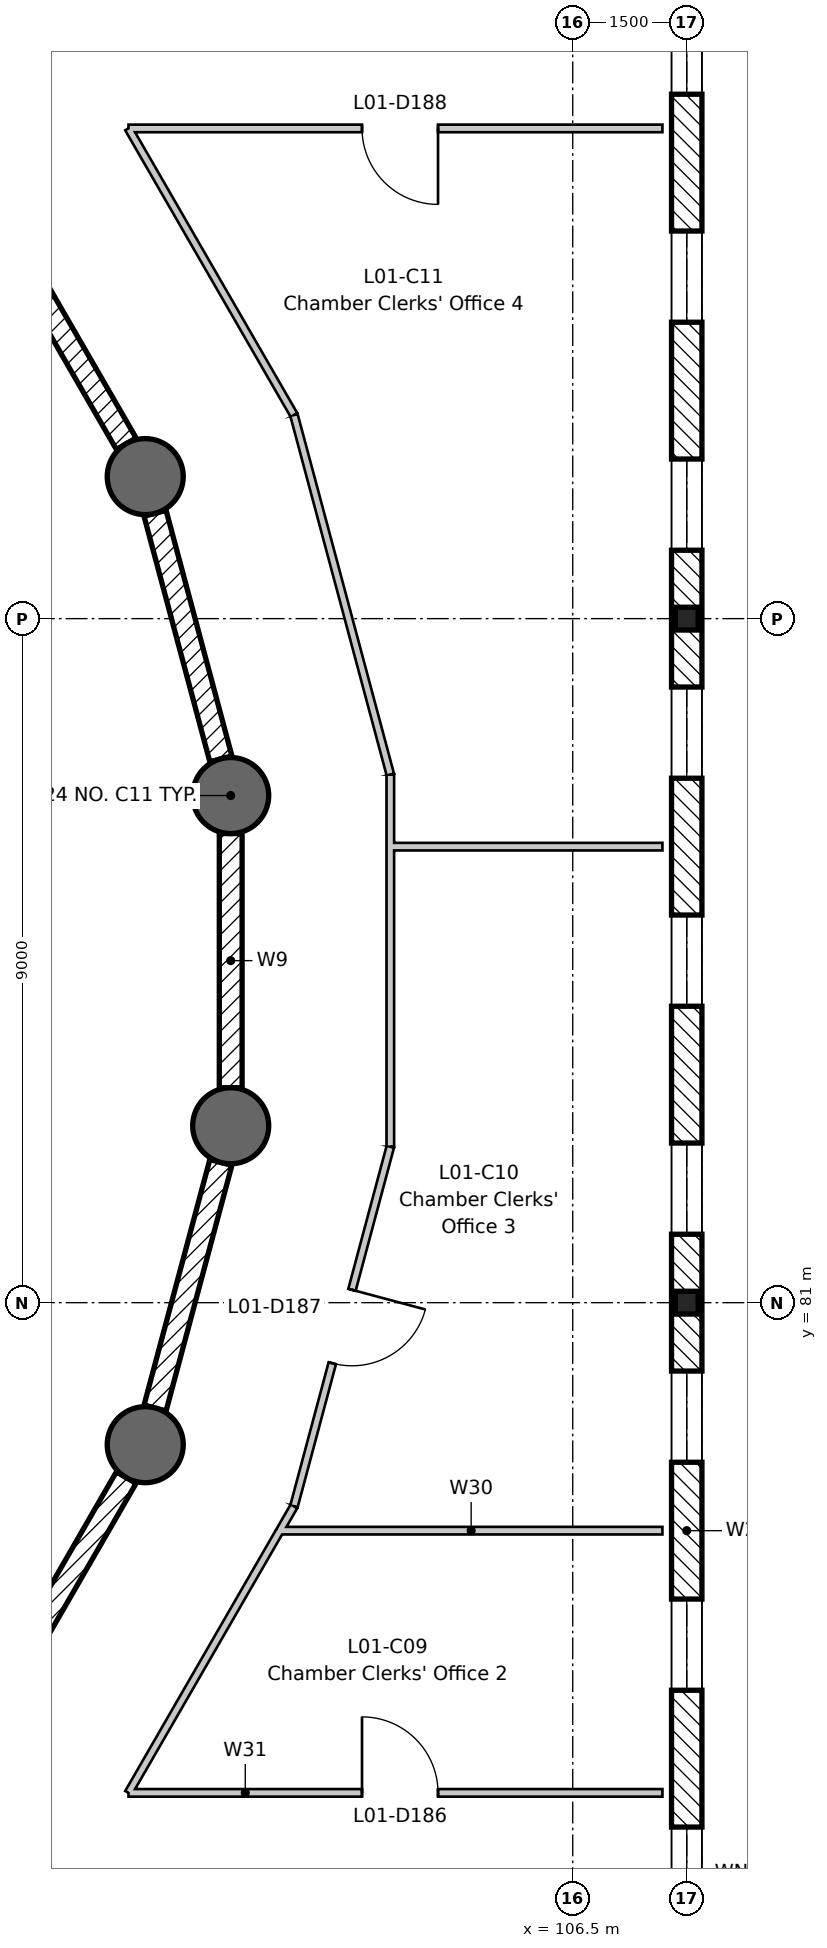
"""IFC4 building model, lengths in metres.
Left out: names, types, materials, properties, quantities, classifications, styles, units other than length and angle.
Written with IfcOpenShell. Run it as: python <this file> out.ifc"""

import sys

from ifc_helpers import new_model, si_unit, direction, frame, frame_2d, origin, origin_2d, place, context, subcontext, project, spatial, rectangle, circle, i_section, extrude, element, fill, save


model = new_model("IFC4")
c1 = context("Model", 3, precision=1e-05, world=origin(), true_north=direction((0.0, 1.0)))
c2 = subcontext(c1, "Body", "Model", "MODEL_VIEW")
j1 = project(units=[si_unit("LENGTHUNIT", "METRE"), si_unit("PLANEANGLEUNIT", "RADIAN")], contexts=[c1])
p1 = place(None, origin())
s1 = spatial("IfcSite", under=j1, at=p1, CompositionType="ELEMENT")
p2 = place(p1, origin())
s2 = spatial("IfcBuilding", under=s1, at=p2, CompositionType="ELEMENT")
p3 = place(p2, frame((0.0, 0.0, 5.4)))
s3 = spatial("IfcBuildingStorey", under=s2, at=p3, CompositionType="ELEMENT", Elevation=5.4)
for number, where, z_axis, x_axis in (
    (1, (102.0, 87.672, -0.2), (0.0, 0.0, 1.0), (1.0, 0.0, 0.0)),
    (2, (100.875, 91.869, -0.2), (0.0, 0.0, 1.0), (1.0, 0.0, 0.0)),
    (3, (100.875, 79.131, -0.2), (0.0, 0.0, 1.0), (1.0, 0.0, 0.0)),
    (4, (102.0, 83.328, -0.2), (0.0, 0.0, 1.0), (1.0, 0.0, 0.0)),
):
    element("IfcColumn", number, at=place(p3, frame(where, z_axis=z_axis, x_axis=x_axis)), inside=s3, PredefinedType="COLUMN", context=c2, shape_type="SweptSolid", body=[
        extrude(circle(Radius=0.5, at=origin_2d()), origin(), (0.0, 0.0, 1.0), 2.7),
    ])
for number, where, z_axis, x_axis in (
    (5, (108.0, 81.0, -0.2), (0.0, 0.0, 1.0), (1.0, 0.0, 0.0)),
    (6, (108.0, 90.0, -0.2), (0.0, 0.0, 1.0), (1.0, 0.0, 0.0)),
):
    element("IfcColumn", number, at=place(p3, frame(where, z_axis=z_axis, x_axis=x_axis)), inside=s3, PredefinedType="COLUMN", context=c2, shape_type="SweptSolid", body=[
        extrude(i_section(OverallWidth=0.3, OverallDepth=0.3, WebThickness=0.011, FlangeThickness=0.019, FilletRadius=0.027, at=origin_2d()), origin(), (0.0, 0.0, 1.0), 4.5),
    ])
for number, where, z_axis, x_axis in (
    (7, (101.871, 88.155, 0.0), (0.0, 0.0, 1.0), (-0.259, 0.966, 0.0)),
    (8, (100.625, 92.302, 0.0), (0.0, 0.0, 1.0), (-0.5, 0.866, 0.0)),
    (9, (98.953, 75.802, 0.0), (0.0, 0.0, 1.0), (0.5, 0.866, 0.0)),
    (10, (101.005, 79.614, 0.0), (0.0, 0.0, 1.0), (0.259, 0.966, 0.0)),
):
    element("IfcWall", number, at=place(p3, frame(where, z_axis=z_axis, x_axis=x_axis)), inside=s3, PredefinedType="PARTITIONING", context=c2, shape_type="SweptSolid", body=[
        extrude(rectangle(XDim=3.344, YDim=0.3, at=frame_2d((1.672, 0.0))), origin(), (0.0, 0.0, 1.0), 2.5),
    ])
p4 = place(p3, frame((102.0, 83.828, 0.0), z_axis=(0.0, 0.0, 1.0), x_axis=(0.0, 1.0, 0.0)))
e11 = element("IfcWall", 11, at=p4, inside=s3, PredefinedType="PARTITIONING", context=c2, shape_type="SweptSolid", body=[
    extrude(rectangle(XDim=3.345, YDim=0.3, at=frame_2d((1.672, 0.0))), origin(), (0.0, 0.0, 1.0), 2.5),
])
p5 = place(p3, frame((108.0, 72.0, 0.0), z_axis=(0.0, 0.0, 1.0), x_axis=(0.0, 1.0, 0.0)))
e12 = element("IfcWall", 12, at=p5, inside=s3, PredefinedType="STANDARD", context=c2, shape_type="SweptSolid", body=[
    extrude(rectangle(XDim=27.0, YDim=0.4, at=frame_2d((13.5, 0.0))), origin(), (0.0, 0.0, 1.0), 3.81),
])
p6 = place(p5, frame((0.9, 0.0, 0.9)))
e13 = element("IfcOpeningElement", 13, at=p6, cuts=e12, PredefinedType="OPENING", context=c2, shape_type="SweptSolid", body=[
    extrude(rectangle(XDim=1.2, YDim=2.4, at=frame_2d((0.6, 1.2))), frame((0.0, 0.21, 0.0), z_axis=(0.0, -1.0, 0.0), x_axis=(1.0, 0.0, 0.0)), (0.0, 0.0, 1.0), 0.42),
])
p7 = place(p5, frame((3.9, 0.0, 0.9)))
e14 = element("IfcOpeningElement", 14, at=p7, cuts=e12, PredefinedType="OPENING", context=c2, shape_type="SweptSolid", body=[
    extrude(rectangle(XDim=1.2, YDim=2.4, at=frame_2d((0.6, 1.2))), frame((0.0, 0.21, 0.0), z_axis=(0.0, -1.0, 0.0), x_axis=(1.0, 0.0, 0.0)), (0.0, 0.0, 1.0), 0.42),
])
p8 = place(p5, frame((6.9, 0.0, 0.9)))
e15 = element("IfcOpeningElement", 15, at=p8, cuts=e12, PredefinedType="OPENING", context=c2, shape_type="SweptSolid", body=[
    extrude(rectangle(XDim=1.2, YDim=2.4, at=frame_2d((0.6, 1.2))), frame((0.0, 0.21, 0.0), z_axis=(0.0, -1.0, 0.0), x_axis=(1.0, 0.0, 0.0)), (0.0, 0.0, 1.0), 0.42),
])
p9 = place(p5, frame((9.9, 0.0, 0.9)))
e16 = element("IfcOpeningElement", 16, at=p9, cuts=e12, PredefinedType="OPENING", context=c2, shape_type="SweptSolid", body=[
    extrude(rectangle(XDim=1.2, YDim=2.4, at=frame_2d((0.6, 1.2))), frame((0.0, 0.21, 0.0), z_axis=(0.0, -1.0, 0.0), x_axis=(1.0, 0.0, 0.0)), (0.0, 0.0, 1.0), 0.42),
])
p10 = place(p5, frame((12.9, 0.0, 0.9)))
e17 = element("IfcOpeningElement", 17, at=p10, cuts=e12, PredefinedType="OPENING", context=c2, shape_type="SweptSolid", body=[
    extrude(rectangle(XDim=1.2, YDim=2.4, at=frame_2d((0.6, 1.2))), frame((0.0, 0.21, 0.0), z_axis=(0.0, -1.0, 0.0), x_axis=(1.0, 0.0, 0.0)), (0.0, 0.0, 1.0), 0.42),
])
p11 = place(p5, frame((15.9, 0.0, 0.9)))
e18 = element("IfcOpeningElement", 18, at=p11, cuts=e12, PredefinedType="OPENING", context=c2, shape_type="SweptSolid", body=[
    extrude(rectangle(XDim=1.2, YDim=2.4, at=frame_2d((0.6, 1.2))), frame((0.0, 0.21, 0.0), z_axis=(0.0, -1.0, 0.0), x_axis=(1.0, 0.0, 0.0)), (0.0, 0.0, 1.0), 0.42),
])
p12 = place(p5, frame((18.9, 0.0, 0.9)))
e19 = element("IfcOpeningElement", 19, at=p12, cuts=e12, PredefinedType="OPENING", context=c2, shape_type="SweptSolid", body=[
    extrude(rectangle(XDim=1.2, YDim=2.4, at=frame_2d((0.6, 1.2))), frame((0.0, 0.21, 0.0), z_axis=(0.0, -1.0, 0.0), x_axis=(1.0, 0.0, 0.0)), (0.0, 0.0, 1.0), 0.42),
])
p13 = place(p5, frame((21.9, 0.0, 0.9)))
e20 = element("IfcOpeningElement", 20, at=p13, cuts=e12, PredefinedType="OPENING", context=c2, shape_type="SweptSolid", body=[
    extrude(rectangle(XDim=1.2, YDim=2.4, at=frame_2d((0.6, 1.2))), frame((0.0, 0.21, 0.0), z_axis=(0.0, -1.0, 0.0), x_axis=(1.0, 0.0, 0.0)), (0.0, 0.0, 1.0), 0.42),
])
p14 = place(p5, frame((24.9, 0.0, 0.9)))
e21 = element("IfcOpeningElement", 21, at=p14, cuts=e12, PredefinedType="OPENING", context=c2, shape_type="SweptSolid", body=[
    extrude(rectangle(XDim=1.2, YDim=2.4, at=frame_2d((0.6, 1.2))), frame((0.0, 0.21, 0.0), z_axis=(0.0, -1.0, 0.0), x_axis=(1.0, 0.0, 0.0)), (0.0, 0.0, 1.0), 0.42),
])
p15 = place(p3, frame((107.68, 78.0, 0.0), z_axis=(0.0, 0.0, 1.0), x_axis=(-1.0, 0.0, 0.0)))
e22 = element("IfcWall", 22, at=p15, inside=s3, PredefinedType="PARTITIONING", context=c2, shape_type="SweptSolid", body=[
    extrude(rectangle(XDim=5.033, YDim=0.1, at=frame_2d((2.516, 0.0))), origin(), (0.0, 0.0, 1.0), 3.81),
])
p16 = place(p3, frame((102.659, 78.02, 0.0), z_axis=(0.0, 0.0, 1.0), x_axis=(-0.500005512359, -0.866022221199, 0.0)))
e23 = element("IfcWall", 23, at=p16, inside=s3, PredefinedType="PARTITIONING", context=c2, shape_type="SweptSolid", body=[
    extrude(rectangle(XDim=4.007, YDim=0.1, at=frame_2d((2.003, 0.0))), origin(), (0.0, 0.0, 1.0), 3.81),
])
p17 = place(p3, frame((100.656, 74.55, 0.0), z_axis=(0.0, 0.0, 1.0), x_axis=(1.0, 0.0, 0.0)))
e24 = element("IfcWall", 24, at=p17, inside=s3, PredefinedType="PARTITIONING", context=c2, shape_type="SweptSolid", body=[
    extrude(rectangle(XDim=7.024, YDim=0.1, at=frame_2d((3.512, 0.0))), origin(), (0.0, 0.0, 1.0), 3.81),
])
p18 = place(p17, frame((3.072, 0.0, 0.0)))
e25 = element("IfcOpeningElement", 25, at=p18, cuts=e24, PredefinedType="OPENING", context=c2, shape_type="SweptSolid", body=[
    extrude(rectangle(XDim=1.0, YDim=2.1, at=frame_2d((0.5, 1.05))), frame((0.0, 0.06, 0.0), z_axis=(0.0, -1.0, 0.0), x_axis=(1.0, 0.0, 0.0)), (0.0, 0.0, 1.0), 0.12),
])
p19 = place(p3, frame((107.68, 87.0, 0.0), z_axis=(0.0, 0.0, 1.0), x_axis=(-1.0, 0.0, 0.0)))
e26 = element("IfcWall", 26, at=p19, inside=s3, PredefinedType="PARTITIONING", context=c2, shape_type="SweptSolid", body=[
    extrude(rectangle(XDim=3.58, YDim=0.1, at=frame_2d((1.79, 0.0))), origin(), (0.0, 0.0, 1.0), 3.81),
])
p20 = place(p3, frame((104.1, 87.02, 0.0), z_axis=(0.0, 0.0, 1.0), x_axis=(0.0, -1.0, 0.0)))
e27 = element("IfcWall", 27, at=p20, inside=s3, PredefinedType="PARTITIONING", context=c2, shape_type="SweptSolid", body=[
    extrude(rectangle(XDim=3.969, YDim=0.1, at=frame_2d((1.984, 0.0))), origin(), (0.0, 0.0, 1.0), 3.81),
])
p21 = place(p3, frame((104.1, 83.051, 0.0), z_axis=(0.0, 0.0, 1.0), x_axis=(-0.258829112515, -0.965923128678, 0.0)))
e28 = element("IfcWall", 28, at=p21, inside=s3, PredefinedType="PARTITIONING", context=c2, shape_type="SweptSolid", body=[
    extrude(rectangle(XDim=4.897, YDim=0.1, at=frame_2d((2.449, 0.0))), origin(), (0.0, 0.0, 1.0), 3.81),
])
p22 = place(p21, frame((1.949, 0.0, 0.0)))
e29 = element("IfcOpeningElement", 29, at=p22, cuts=e28, PredefinedType="OPENING", context=c2, shape_type="SweptSolid", body=[
    extrude(rectangle(XDim=1.0, YDim=2.1, at=frame_2d((0.5, 1.05))), frame((0.0, 0.06, 0.0), z_axis=(0.0, -1.0, 0.0), x_axis=(1.0, 0.0, 0.0)), (0.0, 0.0, 1.0), 0.12),
])
p23 = place(p3, frame((102.833, 78.321, 0.0), z_axis=(0.0, 0.0, 1.0), x_axis=(-0.500173430036, -0.86592525075, 0.0)))
e30 = element("IfcWall", 30, at=p23, inside=s3, PredefinedType="PARTITIONING", context=c2, shape_type="SweptSolid", body=[
    extrude(rectangle(XDim=0.39, YDim=0.1, at=frame_2d((0.195, 0.0))), origin(), (0.0, 0.0, 1.0), 3.81),
])
p24 = place(p3, frame((107.68, 96.45, 0.0), z_axis=(0.0, 0.0, 1.0), x_axis=(-1.0, 0.0, 0.0)))
e31 = element("IfcWall", 31, at=p24, inside=s3, PredefinedType="PARTITIONING", context=c2, shape_type="SweptSolid", body=[
    extrude(rectangle(XDim=7.024, YDim=0.1, at=frame_2d((3.512, 0.0))), origin(), (0.0, 0.0, 1.0), 3.81),
])
p25 = place(p24, frame((2.952, 0.0, 0.0)))
e32 = element("IfcOpeningElement", 32, at=p25, cuts=e31, PredefinedType="OPENING", context=c2, shape_type="SweptSolid", body=[
    extrude(rectangle(XDim=1.0, YDim=2.1, at=frame_2d((0.5, 1.05))), frame((0.0, 0.06, 0.0), z_axis=(0.0, -1.0, 0.0), x_axis=(1.0, 0.0, 0.0)), (0.0, 0.0, 1.0), 0.12),
])
p26 = place(p3, frame((100.656, 96.45, 0.0), z_axis=(0.0, 0.0, 1.0), x_axis=(0.499992644437, -0.866029650479, 0.0)))
e33 = element("IfcWall", 33, at=p26, inside=s3, PredefinedType="PARTITIONING", context=c2, shape_type="SweptSolid", body=[
    extrude(rectangle(XDim=4.354, YDim=0.1, at=frame_2d((2.177, 0.0))), origin(), (0.0, 0.0, 1.0), 3.81),
])
p27 = place(p3, frame((102.833, 92.679, 0.0), z_axis=(0.0, 0.0, 1.0), x_axis=(0.258829112515, -0.965923128678, 0.0)))
e34 = element("IfcWall", 34, at=p27, inside=s3, PredefinedType="PARTITIONING", context=c2, shape_type="SweptSolid", body=[
    extrude(rectangle(XDim=4.897, YDim=0.1, at=frame_2d((2.449, 0.0))), origin(), (0.0, 0.0, 1.0), 3.81),
])
p28 = place(p3, frame((104.1, 87.949, 0.0), z_axis=(0.0, 0.0, 1.0), x_axis=(0.0, -1.0, 0.0)))
e35 = element("IfcWall", 35, at=p28, inside=s3, PredefinedType="PARTITIONING", context=c2, shape_type="SweptSolid", body=[
    extrude(rectangle(XDim=0.969, YDim=0.1, at=frame_2d((0.484, 0.0))), origin(), (0.0, 0.0, 1.0), 3.81),
])
p29 = place(p6, origin())
e36 = element("IfcWindow", 36, at=p29, inside=s3, PartitioningType="SINGLE_PANEL", PredefinedType="WINDOW", context=c2, shape_type="SweptSolid", body=[
    extrude(rectangle(XDim=1.2, YDim=2.4, at=frame_2d((0.6, 1.2))), frame((0.0, 0.03, 0.0), z_axis=(0.0, -1.0, 0.0), x_axis=(1.0, 0.0, 0.0)), (0.0, 0.0, 1.0), 0.06),
])
fill(e13, e36)
p30 = place(p7, origin())
e37 = element("IfcWindow", 37, at=p30, inside=s3, PartitioningType="SINGLE_PANEL", PredefinedType="WINDOW", context=c2, shape_type="SweptSolid", body=[
    extrude(rectangle(XDim=1.2, YDim=2.4, at=frame_2d((0.6, 1.2))), frame((0.0, 0.03, 0.0), z_axis=(0.0, -1.0, 0.0), x_axis=(1.0, 0.0, 0.0)), (0.0, 0.0, 1.0), 0.06),
])
fill(e14, e37)
p31 = place(p8, origin())
e38 = element("IfcWindow", 38, at=p31, inside=s3, PartitioningType="SINGLE_PANEL", PredefinedType="WINDOW", context=c2, shape_type="SweptSolid", body=[
    extrude(rectangle(XDim=1.2, YDim=2.4, at=frame_2d((0.6, 1.2))), frame((0.0, 0.03, 0.0), z_axis=(0.0, -1.0, 0.0), x_axis=(1.0, 0.0, 0.0)), (0.0, 0.0, 1.0), 0.06),
])
fill(e15, e38)
p32 = place(p9, origin())
e39 = element("IfcWindow", 39, at=p32, inside=s3, PartitioningType="SINGLE_PANEL", PredefinedType="WINDOW", context=c2, shape_type="SweptSolid", body=[
    extrude(rectangle(XDim=1.2, YDim=2.4, at=frame_2d((0.6, 1.2))), frame((0.0, 0.03, 0.0), z_axis=(0.0, -1.0, 0.0), x_axis=(1.0, 0.0, 0.0)), (0.0, 0.0, 1.0), 0.06),
])
fill(e16, e39)
p33 = place(p10, origin())
e40 = element("IfcWindow", 40, at=p33, inside=s3, PartitioningType="SINGLE_PANEL", PredefinedType="WINDOW", context=c2, shape_type="SweptSolid", body=[
    extrude(rectangle(XDim=1.2, YDim=2.4, at=frame_2d((0.6, 1.2))), frame((0.0, 0.03, 0.0), z_axis=(0.0, -1.0, 0.0), x_axis=(1.0, 0.0, 0.0)), (0.0, 0.0, 1.0), 0.06),
])
fill(e17, e40)
p34 = place(p11, origin())
e41 = element("IfcWindow", 41, at=p34, inside=s3, PartitioningType="SINGLE_PANEL", PredefinedType="WINDOW", context=c2, shape_type="SweptSolid", body=[
    extrude(rectangle(XDim=1.2, YDim=2.4, at=frame_2d((0.6, 1.2))), frame((0.0, 0.03, 0.0), z_axis=(0.0, -1.0, 0.0), x_axis=(1.0, 0.0, 0.0)), (0.0, 0.0, 1.0), 0.06),
])
fill(e18, e41)
p35 = place(p12, origin())
e42 = element("IfcWindow", 42, at=p35, inside=s3, PartitioningType="SINGLE_PANEL", PredefinedType="WINDOW", context=c2, shape_type="SweptSolid", body=[
    extrude(rectangle(XDim=1.2, YDim=2.4, at=frame_2d((0.6, 1.2))), frame((0.0, 0.03, 0.0), z_axis=(0.0, -1.0, 0.0), x_axis=(1.0, 0.0, 0.0)), (0.0, 0.0, 1.0), 0.06),
])
fill(e19, e42)
p36 = place(p13, origin())
e43 = element("IfcWindow", 43, at=p36, inside=s3, PartitioningType="SINGLE_PANEL", PredefinedType="WINDOW", context=c2, shape_type="SweptSolid", body=[
    extrude(rectangle(XDim=1.2, YDim=2.4, at=frame_2d((0.6, 1.2))), frame((0.0, 0.03, 0.0), z_axis=(0.0, -1.0, 0.0), x_axis=(1.0, 0.0, 0.0)), (0.0, 0.0, 1.0), 0.06),
])
fill(e20, e43)
p37 = place(p14, origin())
e44 = element("IfcWindow", 44, at=p37, inside=s3, PartitioningType="SINGLE_PANEL", PredefinedType="WINDOW", context=c2, shape_type="SweptSolid", body=[
    extrude(rectangle(XDim=1.2, YDim=2.4, at=frame_2d((0.6, 1.2))), frame((0.0, 0.03, 0.0), z_axis=(0.0, -1.0, 0.0), x_axis=(1.0, 0.0, 0.0)), (0.0, 0.0, 1.0), 0.06),
])
fill(e21, e44)
p38 = place(p18, origin())
e45 = element("IfcDoor", 45, at=p38, inside=s3, OperationType="SINGLE_SWING_LEFT", PredefinedType="DOOR", context=c2, shape_type="SweptSolid", body=[
    extrude(rectangle(XDim=1.0, YDim=2.1, at=frame_2d((0.5, 1.05))), frame((0.0, 0.025, 0.0), z_axis=(0.0, -1.0, 0.0), x_axis=(1.0, 0.0, 0.0)), (0.0, 0.0, 1.0), 0.05),
])
fill(e25, e45)
p39 = place(p22, origin())
e46 = element("IfcDoor", 46, at=p39, inside=s3, OperationType="SINGLE_SWING_LEFT", PredefinedType="DOOR", context=c2, shape_type="SweptSolid", body=[
    extrude(rectangle(XDim=1.0, YDim=2.1, at=frame_2d((0.5, 1.05))), frame((0.0, 0.025, 0.0), z_axis=(0.0, -1.0, 0.0), x_axis=(1.0, 0.0, 0.0)), (0.0, 0.0, 1.0), 0.05),
])
fill(e29, e46)
p40 = place(p25, origin())
e47 = element("IfcDoor", 47, at=p40, inside=s3, OperationType="SINGLE_SWING_LEFT", PredefinedType="DOOR", context=c2, shape_type="SweptSolid", body=[
    extrude(rectangle(XDim=1.0, YDim=2.1, at=frame_2d((0.5, 1.05))), frame((0.0, 0.025, 0.0), z_axis=(0.0, -1.0, 0.0), x_axis=(1.0, 0.0, 0.0)), (0.0, 0.0, 1.0), 0.05),
])
fill(e32, e47)
save(model, sys.argv[1])
